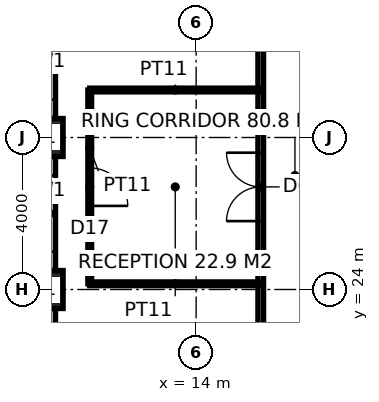
"""IFC4 building model, lengths in metres.
Left out: names, types, materials, properties, quantities, classifications, styles, units other than length and angle.
Written with IfcOpenShell. Run it as: python <this file> out.ifc"""

import sys

from ifc_helpers import new_model, si_unit, direction, frame, frame_2d, origin, origin_2d, place, context, subcontext, project, spatial, rectangle, hollow_rectangle, extrude, element, fill, save


model = new_model("IFC4")
c1 = context("Model", 3, precision=1e-05, world=origin(), true_north=direction((0.0, 1.0)))
c2 = subcontext(c1, "Body", "Model", "MODEL_VIEW")
j1 = project(units=[si_unit("LENGTHUNIT", "METRE"), si_unit("PLANEANGLEUNIT", "RADIAN")], contexts=[c1])
p1 = place(None, origin())
s1 = spatial("IfcSite", under=j1, at=p1, CompositionType="ELEMENT")
p2 = place(p1, origin())
s2 = spatial("IfcBuilding", under=s1, at=p2, CompositionType="ELEMENT")
p3 = place(p2, frame((0.0, 0.0, 81.4)))
s3 = spatial("IfcBuildingStorey", under=s2, at=p3, CompositionType="ELEMENT", Elevation=81.4)
for number, where, z_axis, x_axis in (
    (1, (10.0, 24.0, 0.0), (0.0, 0.0, 1.0), (1.0, 0.0, 0.0)),
    (2, (10.0, 28.0, 0.0), (0.0, 0.0, 1.0), (1.0, 0.0, 0.0)),
):
    element("IfcColumn", number, at=place(p3, frame(where, z_axis=z_axis, x_axis=x_axis)), inside=s3, PredefinedType="COLUMN", context=c2, shape_type="SweptSolid", body=[
        extrude(hollow_rectangle(XDim=1.0, YDim=1.0, WallThickness=0.1, at=origin_2d()), origin(), (0.0, 0.0, 1.0), 4.0),
    ])
p4 = place(p3, frame((15.7, 15.025, 0.0), z_axis=(0.0, 0.0, 1.0), x_axis=(0.0, 1.0, 0.0)))
e3 = element("IfcWall", 3, at=p4, inside=s3, PredefinedType="PARTITIONING", context=c2, shape_type="SweptSolid", body=[
    extrude(rectangle(XDim=23.35, YDim=0.15, at=frame_2d((11.675, 0.0))), origin(), (0.0, 0.0, 1.0), 3.85),
])
p5 = place(p4, frame((10.775, 0.0, 0.0)))
e4 = element("IfcOpeningElement", 4, at=p5, cuts=e3, PredefinedType="OPENING", context=c2, shape_type="SweptSolid", body=[
    extrude(rectangle(XDim=1.8, YDim=2.4, at=frame_2d((0.9, 1.2))), frame((0.0, 0.085, 0.0), z_axis=(0.0, -1.0, 0.0), x_axis=(1.0, 0.0, 0.0)), (0.0, 0.0, 1.0), 0.17),
])
p6 = place(p3, frame((15.7, 29.25, 0.0), z_axis=(0.0, 0.0, 1.0), x_axis=(-1.0, 0.0, 0.0)))
e5 = element("IfcWall", 5, at=p6, inside=s3, PredefinedType="PARTITIONING", context=c2, shape_type="SweptSolid", body=[
    extrude(rectangle(XDim=4.5, YDim=0.1, at=frame_2d((2.25, 0.0))), origin(), (0.0, 0.0, 1.0), 3.85),
])
p7 = place(p3, frame((11.2, 29.25, 0.0), z_axis=(0.0, 0.0, 1.0), x_axis=(0.0, -1.0, 0.0)))
e6 = element("IfcWall", 6, at=p7, inside=s3, PredefinedType="PARTITIONING", context=c2, shape_type="SweptSolid", body=[
    extrude(rectangle(XDim=5.1, YDim=0.1, at=frame_2d((2.55, 0.0))), origin(), (0.0, 0.0, 1.0), 3.85),
])
p8 = place(p7, frame((2.05, 0.0, 0.0)))
e7 = element("IfcOpeningElement", 7, at=p8, cuts=e6, PredefinedType="OPENING", context=c2, shape_type="SweptSolid", body=[
    extrude(rectangle(XDim=1.0, YDim=2.2, at=frame_2d((0.5, 1.1))), frame((0.0, 0.06, 0.0), z_axis=(0.0, -1.0, 0.0), x_axis=(1.0, 0.0, 0.0)), (0.0, 0.0, 1.0), 0.12),
])
p9 = place(p3, frame((11.2, 24.15, 0.0), z_axis=(0.0, 0.0, 1.0), x_axis=(1.0, 0.0, 0.0)))
e8 = element("IfcWall", 8, at=p9, inside=s3, PredefinedType="PARTITIONING", context=c2, shape_type="SweptSolid", body=[
    extrude(rectangle(XDim=4.5, YDim=0.1, at=frame_2d((2.25, 0.0))), origin(), (0.0, 0.0, 1.0), 2.95),
])
p10 = place(p3, frame((10.15, 23.5, 0.0), z_axis=(0.0, 0.0, 1.0), x_axis=(0.0, -1.0, 0.0)))
e9 = element("IfcWall", 9, at=p10, inside=s3, PredefinedType="ELEMENTEDWALL", context=c2, shape_type="SweptSolid", body=[
    extrude(rectangle(XDim=3.0, YDim=0.3, at=frame_2d((1.5, 0.0))), origin(), (0.0, 0.0, 1.0), 2.85),
])
p11 = place(p10, frame((0.5, 0.0, 0.8)))
e10 = element("IfcOpeningElement", 10, at=p11, cuts=e9, PredefinedType="OPENING", context=c2, shape_type="SweptSolid", body=[
    extrude(rectangle(XDim=2.0, YDim=2.0, at=frame_2d((1.0, 1.0))), frame((0.0, 0.16, 0.0), z_axis=(0.0, -1.0, 0.0), x_axis=(1.0, 0.0, 0.0)), (0.0, 0.0, 1.0), 0.32),
])
p12 = place(p3, frame((10.15, 27.5, 0.0), z_axis=(0.0, 0.0, 1.0), x_axis=(0.0, -1.0, 0.0)))
e11 = element("IfcWall", 11, at=p12, inside=s3, PredefinedType="ELEMENTEDWALL", context=c2, shape_type="SweptSolid", body=[
    extrude(rectangle(XDim=3.0, YDim=0.3, at=frame_2d((1.5, 0.0))), origin(), (0.0, 0.0, 1.0), 2.85),
])
p13 = place(p12, frame((0.5, 0.0, 0.8)))
e12 = element("IfcOpeningElement", 12, at=p13, cuts=e11, PredefinedType="OPENING", context=c2, shape_type="SweptSolid", body=[
    extrude(rectangle(XDim=2.0, YDim=2.0, at=frame_2d((1.0, 1.0))), frame((0.0, 0.16, 0.0), z_axis=(0.0, -1.0, 0.0), x_axis=(1.0, 0.0, 0.0)), (0.0, 0.0, 1.0), 0.32),
])
p14 = place(p3, frame((10.15, 31.5, 0.0), z_axis=(0.0, 0.0, 1.0), x_axis=(0.0, -1.0, 0.0)))
e13 = element("IfcWall", 13, at=p14, inside=s3, PredefinedType="ELEMENTEDWALL", context=c2, shape_type="SweptSolid", body=[
    extrude(rectangle(XDim=3.0, YDim=0.3, at=frame_2d((1.5, 0.0))), origin(), (0.0, 0.0, 1.0), 2.85),
])
p15 = place(p14, frame((0.5, 0.0, 0.8)))
e14 = element("IfcOpeningElement", 14, at=p15, cuts=e13, PredefinedType="OPENING", context=c2, shape_type="SweptSolid", body=[
    extrude(rectangle(XDim=2.0, YDim=2.0, at=frame_2d((1.0, 1.0))), frame((0.0, 0.16, 0.0), z_axis=(0.0, -1.0, 0.0), x_axis=(1.0, 0.0, 0.0)), (0.0, 0.0, 1.0), 0.32),
])
p16 = place(p5, origin())
e15 = element("IfcDoor", 15, at=p16, inside=s3, OperationType="DOUBLE_DOOR_DOUBLE_SWING", PredefinedType="DOOR", context=c2, shape_type="SweptSolid", body=[
    extrude(rectangle(XDim=1.8, YDim=2.4, at=frame_2d((0.9, 1.2))), frame((0.0, 0.025, 0.0), z_axis=(0.0, -1.0, 0.0), x_axis=(1.0, 0.0, 0.0)), (0.0, 0.0, 1.0), 0.05),
])
fill(e4, e15)
p17 = place(p8, origin())
e16 = element("IfcDoor", 16, at=p17, inside=s3, OperationType="SINGLE_SWING_RIGHT", PredefinedType="DOOR", context=c2, shape_type="SweptSolid", body=[
    extrude(rectangle(XDim=1.0, YDim=2.2, at=frame_2d((0.5, 1.1))), frame((0.0, 0.025, 0.0), z_axis=(0.0, -1.0, 0.0), x_axis=(1.0, 0.0, 0.0)), (0.0, 0.0, 1.0), 0.05),
])
fill(e7, e16)
save(model, sys.argv[1])
